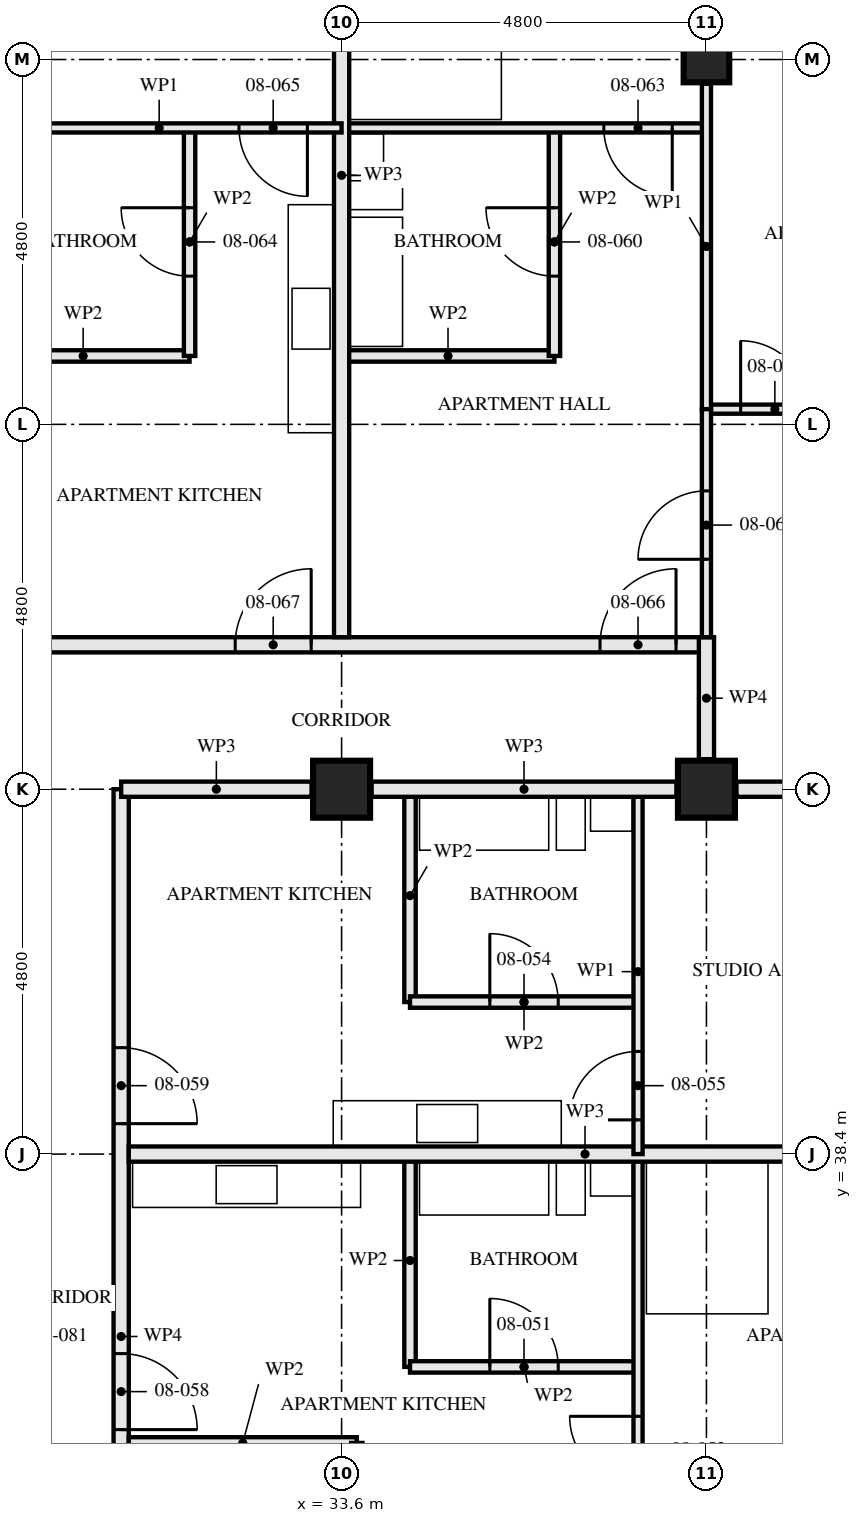
"""IFC4 building model, lengths in metres.
Left out: names, types, materials, properties, quantities, classifications, styles, units other than length and angle.
Written with IfcOpenShell. Run it as: python <this file> out.ifc"""

import sys

from ifc_helpers import new_model, si_unit, direction, frame, frame_2d, origin, origin_2d, place, context, subcontext, project, spatial, rectangle, hollow_rectangle, extrude, element, fill, save


model = new_model("IFC4")
c1 = context("Model", 3, precision=1e-05, world=origin(), true_north=direction((0.0, 1.0)))
c2 = subcontext(c1, "Body", "Model", "MODEL_VIEW")
j1 = project(units=[si_unit("LENGTHUNIT", "METRE"), si_unit("PLANEANGLEUNIT", "RADIAN")], contexts=[c1])
p1 = place(None, origin())
s1 = spatial("IfcSite", under=j1, at=p1, CompositionType="ELEMENT")
p2 = place(p1, origin())
s2 = spatial("IfcBuilding", under=s1, at=p2, CompositionType="ELEMENT")
p3 = place(p2, frame((0.0, 0.0, 34.0)))
s3 = spatial("IfcBuildingStorey", under=s2, at=p3, CompositionType="ELEMENT", Elevation=34.0)
for number, where, z_axis, x_axis in (
    (1, (33.6, 43.2, 0.0), (0.0, 0.0, 1.0), (0.0, 1.0, 0.0)),
    (2, (38.4, 43.2, 0.0), (0.0, 0.0, 1.0), (0.0, 1.0, 0.0)),
):
    element("IfcColumn", number, at=place(p3, frame(where, z_axis=z_axis, x_axis=x_axis)), inside=s3, PredefinedType="COLUMN", context=c2, shape_type="SweptSolid", body=[
        extrude(hollow_rectangle(XDim=0.75, YDim=0.75, WallThickness=0.08, at=origin_2d()), origin(), (0.0, 0.0, 1.0), 3.5),
    ])
p4 = place(p3, frame((38.4, 52.8, 0.0), z_axis=(0.0, 0.0, 1.0), x_axis=(0.0, 1.0, 0.0)))
e3 = element("IfcColumn", 3, at=p4, inside=s3, PredefinedType="COLUMN", context=c2, shape_type="SweptSolid", body=[
    extrude(hollow_rectangle(XDim=0.6, YDim=0.6, WallThickness=0.05, at=origin_2d()), origin(), (0.0, 0.0, 1.0), 3.5),
])
p5 = place(p3, frame((33.8, 32.2, 0.0), z_axis=(0.0, 0.0, 1.0), x_axis=(0.0, 1.0, 0.0)))
e4 = element("IfcWall", 4, at=p5, inside=s3, PredefinedType="PARTITIONING", context=c2, shape_type="SweptSolid", body=[
    extrude(rectangle(XDim=2.4, YDim=0.15, at=frame_2d((1.2, 0.0))), origin(), (0.0, 0.0, 1.0), 2.55),
])
p6 = place(p3, frame((33.8, 34.6, 0.0), z_axis=(0.0, 0.0, 1.0), x_axis=(-1.0, 0.0, 0.0)))
e5 = element("IfcWall", 5, at=p6, inside=s3, PredefinedType="PARTITIONING", context=c2, shape_type="SweptSolid", body=[
    extrude(rectangle(XDim=3.0, YDim=0.15, at=frame_2d((1.5, 0.0))), origin(), (0.0, 0.0, 1.0), 3.33),
])
p7 = place(p3, frame((37.5, 35.6, 0.0), z_axis=(0.0, 0.0, 1.0), x_axis=(-1.0, 0.0, 0.0)))
e6 = element("IfcWall", 6, at=p7, inside=s3, PredefinedType="PARTITIONING", context=c2, shape_type="SweptSolid", body=[
    extrude(rectangle(XDim=3.0, YDim=0.15, at=frame_2d((1.5, 0.0))), origin(), (0.0, 0.0, 1.0), 3.33),
])
p8 = place(p7, frame((1.05, 0.0, 0.0)))
e7 = element("IfcOpeningElement", 7, at=p8, cuts=e6, PredefinedType="OPENING", context=c2, shape_type="SweptSolid", body=[
    extrude(rectangle(XDim=0.9, YDim=2.1, at=frame_2d((0.45, 1.05))), frame((0.0, 0.085, 0.0), z_axis=(0.0, -1.0, 0.0), x_axis=(1.0, 0.0, 0.0)), (0.0, 0.0, 1.0), 0.171),
])
p9 = place(p3, frame((34.5, 35.6, 0.0), z_axis=(0.0, 0.0, 1.0), x_axis=(0.0, 1.0, 0.0)))
e8 = element("IfcWall", 8, at=p9, inside=s3, PredefinedType="PARTITIONING", context=c2, shape_type="SweptSolid", body=[
    extrude(rectangle(XDim=2.8, YDim=0.15, at=frame_2d((1.4, 0.0))), origin(), (0.0, 0.0, 1.0), 3.33),
])
p10 = place(p3, frame((37.5, 33.6, 0.0), z_axis=(0.0, 0.0, 1.0), x_axis=(0.0, 1.0, 0.0)))
e9 = element("IfcWall", 9, at=p10, inside=s3, PredefinedType="PARTITIONING", context=c2, shape_type="SweptSolid", body=[
    extrude(rectangle(XDim=4.8, YDim=0.12, at=frame_2d((2.4, 0.0))), origin(), (0.0, 0.0, 1.0), 3.33),
])
p11 = place(p10, frame((0.45, 0.0, 0.0)))
e10 = element("IfcOpeningElement", 10, at=p11, cuts=e9, PredefinedType="OPENING", context=c2, shape_type="SweptSolid", body=[
    extrude(rectangle(XDim=0.9, YDim=2.1, at=frame_2d((0.45, 1.05))), frame((0.0, 0.071, 0.0), z_axis=(0.0, -1.0, 0.0), x_axis=(1.0, 0.0, 0.0)), (0.0, 0.0, 1.0), 0.141),
])
p12 = place(p3, frame((42.805, 38.4, 0.0), z_axis=(0.0, 0.0, 1.0), x_axis=(-1.0, 0.0, 0.0)))
e11 = element("IfcWall", 11, at=p12, inside=s3, PredefinedType="PARTITIONING", context=c2, shape_type="SweptSolid", body=[
    extrude(rectangle(XDim=12.005, YDim=0.2, at=frame_2d((6.002, 0.0))), origin(), (0.0, 0.0, 1.0), 2.55),
])
p13 = place(p3, frame((37.5, 40.4, 0.0), z_axis=(0.0, 0.0, 1.0), x_axis=(-1.0, 0.0, 0.0)))
e12 = element("IfcWall", 12, at=p13, inside=s3, PredefinedType="PARTITIONING", context=c2, shape_type="SweptSolid", body=[
    extrude(rectangle(XDim=3.0, YDim=0.15, at=frame_2d((1.5, 0.0))), origin(), (0.0, 0.0, 1.0), 3.33),
])
p14 = place(p13, frame((1.05, 0.0, 0.0)))
e13 = element("IfcOpeningElement", 13, at=p14, cuts=e12, PredefinedType="OPENING", context=c2, shape_type="SweptSolid", body=[
    extrude(rectangle(XDim=0.9, YDim=2.1, at=frame_2d((0.45, 1.05))), frame((0.0, 0.085, 0.0), z_axis=(0.0, -1.0, 0.0), x_axis=(1.0, 0.0, 0.0)), (0.0, 0.0, 1.0), 0.171),
])
p15 = place(p3, frame((34.5, 40.4, 0.0), z_axis=(0.0, 0.0, 1.0), x_axis=(0.0, 1.0, 0.0)))
e14 = element("IfcWall", 14, at=p15, inside=s3, PredefinedType="PARTITIONING", context=c2, shape_type="SweptSolid", body=[
    extrude(rectangle(XDim=2.8, YDim=0.15, at=frame_2d((1.4, 0.0))), origin(), (0.0, 0.0, 1.0), 3.33),
])
p16 = place(p3, frame((37.5, 38.4, 0.0), z_axis=(0.0, 0.0, 1.0), x_axis=(0.0, 1.0, 0.0)))
e15 = element("IfcWall", 15, at=p16, inside=s3, PredefinedType="PARTITIONING", context=c2, shape_type="SweptSolid", body=[
    extrude(rectangle(XDim=4.8, YDim=0.12, at=frame_2d((2.4, 0.0))), origin(), (0.0, 0.0, 1.0), 3.33),
])
p17 = place(p16, frame((0.45, 0.0, 0.0)))
e16 = element("IfcOpeningElement", 16, at=p17, cuts=e15, PredefinedType="OPENING", context=c2, shape_type="SweptSolid", body=[
    extrude(rectangle(XDim=0.9, YDim=2.1, at=frame_2d((0.45, 1.05))), frame((0.0, 0.071, 0.0), z_axis=(0.0, -1.0, 0.0), x_axis=(1.0, 0.0, 0.0)), (0.0, 0.0, 1.0), 0.141),
])
p18 = place(p3, frame((30.7, 28.8, 0.0), z_axis=(0.0, 0.0, 1.0), x_axis=(0.0, 1.0, 0.0)))
e17 = element("IfcWall", 17, at=p18, inside=s3, PredefinedType="PARTITIONING", context=c2, shape_type="SweptSolid", body=[
    extrude(rectangle(XDim=14.4, YDim=0.2, at=frame_2d((7.2, 0.0))), origin(), (0.0, 0.0, 1.0), 2.55),
])
p19 = place(p18, frame((1.4, 0.0, 0.0)))
e18 = element("IfcOpeningElement", 18, at=p19, cuts=e17, PredefinedType="OPENING", context=c2, shape_type="SweptSolid", body=[
    extrude(rectangle(XDim=1.0, YDim=2.1, at=frame_2d((0.5, 1.05))), frame((0.0, 0.111, 0.0), z_axis=(0.0, -1.0, 0.0), x_axis=(1.0, 0.0, 0.0)), (0.0, 0.0, 1.0), 0.221),
])
p20 = place(p18, frame((4.1, 0.0, 0.0)))
e19 = element("IfcOpeningElement", 19, at=p20, cuts=e17, PredefinedType="OPENING", context=c2, shape_type="SweptSolid", body=[
    extrude(rectangle(XDim=1.0, YDim=2.1, at=frame_2d((0.5, 1.05))), frame((0.0, 0.111, 0.0), z_axis=(0.0, -1.0, 0.0), x_axis=(1.0, 0.0, 0.0)), (0.0, 0.0, 1.0), 0.221),
])
p21 = place(p18, frame((5.975, 0.0, 0.0)))
e20 = element("IfcOpeningElement", 20, at=p21, cuts=e17, PredefinedType="OPENING", context=c2, shape_type="SweptSolid", body=[
    extrude(rectangle(XDim=1.0, YDim=2.1, at=frame_2d((0.5, 1.05))), frame((0.0, 0.111, 0.0), z_axis=(0.0, -1.0, 0.0), x_axis=(1.0, 0.0, 0.0)), (0.0, 0.0, 1.0), 0.221),
])
p22 = place(p18, frame((10.0, 0.0, 0.0)))
e21 = element("IfcOpeningElement", 21, at=p22, cuts=e17, PredefinedType="OPENING", context=c2, shape_type="SweptSolid", body=[
    extrude(rectangle(XDim=1.0, YDim=2.1, at=frame_2d((0.5, 1.05))), frame((0.0, 0.111, 0.0), z_axis=(0.0, -1.0, 0.0), x_axis=(1.0, 0.0, 0.0)), (0.0, 0.0, 1.0), 0.221),
])
p23 = place(p3, frame((36.4, 51.9, 0.0), z_axis=(0.0, 0.0, 1.0), x_axis=(0.0, -1.0, 0.0)))
e22 = element("IfcWall", 22, at=p23, inside=s3, PredefinedType="PARTITIONING", context=c2, shape_type="SweptSolid", body=[
    extrude(rectangle(XDim=3.0, YDim=0.15, at=frame_2d((1.5, 0.0))), origin(), (0.0, 0.0, 1.0), 3.33),
])
p24 = place(p23, frame((1.05, 0.0, 0.0)))
e23 = element("IfcOpeningElement", 23, at=p24, cuts=e22, PredefinedType="OPENING", context=c2, shape_type="SweptSolid", body=[
    extrude(rectangle(XDim=0.9, YDim=2.1, at=frame_2d((0.45, 1.05))), frame((0.0, 0.085, 0.0), z_axis=(0.0, -1.0, 0.0), x_axis=(1.0, 0.0, 0.0)), (0.0, 0.0, 1.0), 0.171),
])
p25 = place(p3, frame((36.4, 48.9, 0.0), z_axis=(0.0, 0.0, 1.0), x_axis=(-1.0, 0.0, 0.0)))
e24 = element("IfcWall", 24, at=p25, inside=s3, PredefinedType="PARTITIONING", context=c2, shape_type="SweptSolid", body=[
    extrude(rectangle(XDim=2.8, YDim=0.15, at=frame_2d((1.4, 0.0))), origin(), (0.0, 0.0, 1.0), 3.33),
])
p26 = place(p3, frame((38.4, 48.2, 0.0), z_axis=(0.0, 0.0, 1.0), x_axis=(0.0, -1.0, 0.0)))
e25 = element("IfcWall", 25, at=p26, inside=s3, PredefinedType="PARTITIONING", context=c2, shape_type="SweptSolid", body=[
    extrude(rectangle(XDim=3.0, YDim=0.12, at=frame_2d((1.5, 0.0))), origin(), (0.0, 0.0, 1.0), 2.55),
])
p27 = place(p26, frame((1.075, 0.0, 0.0)))
e26 = element("IfcOpeningElement", 26, at=p27, cuts=e25, PredefinedType="OPENING", context=c2, shape_type="SweptSolid", body=[
    extrude(rectangle(XDim=0.9, YDim=2.1, at=frame_2d((0.45, 1.05))), frame((0.0, 0.071, 0.0), z_axis=(0.0, -1.0, 0.0), x_axis=(1.0, 0.0, 0.0)), (0.0, 0.0, 1.0), 0.141),
])
p28 = place(p3, frame((42.953, 48.2, 0.0), z_axis=(0.0, 0.0, 1.0), x_axis=(-1.0, 0.0, 0.0)))
e27 = element("IfcWall", 27, at=p28, inside=s3, PredefinedType="PARTITIONING", context=c2, shape_type="SweptSolid", body=[
    extrude(rectangle(XDim=4.553, YDim=0.12, at=frame_2d((2.276, 0.0))), origin(), (0.0, 0.0, 1.0), 3.33),
])
p29 = place(p28, frame((3.203, 0.0, 0.0)))
e28 = element("IfcOpeningElement", 28, at=p29, cuts=e27, PredefinedType="OPENING", context=c2, shape_type="SweptSolid", body=[
    extrude(rectangle(XDim=0.9, YDim=2.1, at=frame_2d((0.45, 1.05))), frame((0.0, 0.071, 0.0), z_axis=(0.0, -1.0, 0.0), x_axis=(1.0, 0.0, 0.0)), (0.0, 0.0, 1.0), 0.141),
])
p30 = place(p3, frame((38.4, 51.9, 0.0), z_axis=(0.0, 0.0, 1.0), x_axis=(-1.0, 0.0, 0.0)))
e29 = element("IfcWall", 29, at=p30, inside=s3, PredefinedType="PARTITIONING", context=c2, shape_type="SweptSolid", body=[
    extrude(rectangle(XDim=4.8, YDim=0.12, at=frame_2d((2.4, 0.0))), origin(), (0.0, 0.0, 1.0), 3.33),
])
p31 = place(p30, frame((0.45, 0.0, 0.0)))
e30 = element("IfcOpeningElement", 30, at=p31, cuts=e29, PredefinedType="OPENING", context=c2, shape_type="SweptSolid", body=[
    extrude(rectangle(XDim=0.9, YDim=2.1, at=frame_2d((0.45, 1.05))), frame((0.0, 0.071, 0.0), z_axis=(0.0, -1.0, 0.0), x_axis=(1.0, 0.0, 0.0)), (0.0, 0.0, 1.0), 0.141),
])
p32 = place(p3, frame((38.4, 52.48, 0.0), z_axis=(0.0, 0.0, 1.0), x_axis=(0.0, -1.0, 0.0)))
e31 = element("IfcWall", 31, at=p32, inside=s3, PredefinedType="PARTITIONING", context=c2, shape_type="SweptSolid", body=[
    extrude(rectangle(XDim=4.28, YDim=0.12, at=frame_2d((2.14, 0.0))), origin(), (0.0, 0.0, 1.0), 3.33),
])
p33 = place(p3, frame((33.6, 57.353, 0.0), z_axis=(0.0, 0.0, 1.0), x_axis=(0.0, -1.0, 0.0)))
e32 = element("IfcWall", 32, at=p33, inside=s3, PredefinedType="PARTITIONING", context=c2, shape_type="SweptSolid", body=[
    extrude(rectangle(XDim=12.153, YDim=0.2, at=frame_2d((6.077, 0.0))), origin(), (0.0, 0.0, 1.0), 2.55),
])
p34 = place(p3, frame((31.6, 51.9, 0.0), z_axis=(0.0, 0.0, 1.0), x_axis=(0.0, -1.0, 0.0)))
e33 = element("IfcWall", 33, at=p34, inside=s3, PredefinedType="PARTITIONING", context=c2, shape_type="SweptSolid", body=[
    extrude(rectangle(XDim=3.0, YDim=0.15, at=frame_2d((1.5, 0.0))), origin(), (0.0, 0.0, 1.0), 3.33),
])
p35 = place(p34, frame((1.05, 0.0, 0.0)))
e34 = element("IfcOpeningElement", 34, at=p35, cuts=e33, PredefinedType="OPENING", context=c2, shape_type="SweptSolid", body=[
    extrude(rectangle(XDim=0.9, YDim=2.1, at=frame_2d((0.45, 1.05))), frame((0.0, 0.085, 0.0), z_axis=(0.0, -1.0, 0.0), x_axis=(1.0, 0.0, 0.0)), (0.0, 0.0, 1.0), 0.171),
])
p36 = place(p3, frame((31.6, 48.9, 0.0), z_axis=(0.0, 0.0, 1.0), x_axis=(-1.0, 0.0, 0.0)))
e35 = element("IfcWall", 35, at=p36, inside=s3, PredefinedType="PARTITIONING", context=c2, shape_type="SweptSolid", body=[
    extrude(rectangle(XDim=2.8, YDim=0.15, at=frame_2d((1.4, 0.0))), origin(), (0.0, 0.0, 1.0), 3.33),
])
p37 = place(p3, frame((33.6, 51.9, 0.0), z_axis=(0.0, 0.0, 1.0), x_axis=(-1.0, 0.0, 0.0)))
e36 = element("IfcWall", 36, at=p37, inside=s3, PredefinedType="PARTITIONING", context=c2, shape_type="SweptSolid", body=[
    extrude(rectangle(XDim=4.8, YDim=0.12, at=frame_2d((2.4, 0.0))), origin(), (0.0, 0.0, 1.0), 3.33),
])
p38 = place(p37, frame((0.45, 0.0, 0.0)))
e37 = element("IfcOpeningElement", 37, at=p38, cuts=e36, PredefinedType="OPENING", context=c2, shape_type="SweptSolid", body=[
    extrude(rectangle(XDim=0.9, YDim=2.1, at=frame_2d((0.45, 1.05))), frame((0.0, 0.071, 0.0), z_axis=(0.0, -1.0, 0.0), x_axis=(1.0, 0.0, 0.0)), (0.0, 0.0, 1.0), 0.141),
])
p39 = place(p3, frame((38.4, 45.1, 0.0), z_axis=(0.0, 0.0, 1.0), x_axis=(-1.0, 0.0, 0.0)))
e38 = element("IfcWall", 38, at=p39, inside=s3, PredefinedType="PARTITIONING", context=c2, shape_type="SweptSolid", body=[
    extrude(rectangle(XDim=9.6, YDim=0.2, at=frame_2d((4.8, 0.0))), origin(), (0.0, 0.0, 1.0), 3.33),
])
p40 = place(p39, frame((0.4, 0.0, 0.0)))
e39 = element("IfcOpeningElement", 39, at=p40, cuts=e38, PredefinedType="OPENING", context=c2, shape_type="SweptSolid", body=[
    extrude(rectangle(XDim=1.0, YDim=2.1, at=frame_2d((0.5, 1.05))), frame((0.0, 0.111, 0.0), z_axis=(0.0, -1.0, 0.0), x_axis=(1.0, 0.0, 0.0)), (0.0, 0.0, 1.0), 0.221),
])
p41 = place(p39, frame((5.2, 0.0, 0.0)))
e40 = element("IfcOpeningElement", 40, at=p41, cuts=e38, PredefinedType="OPENING", context=c2, shape_type="SweptSolid", body=[
    extrude(rectangle(XDim=1.0, YDim=2.1, at=frame_2d((0.5, 1.05))), frame((0.0, 0.111, 0.0), z_axis=(0.0, -1.0, 0.0), x_axis=(1.0, 0.0, 0.0)), (0.0, 0.0, 1.0), 0.221),
])
p42 = place(p3, frame((38.4, 45.2, 0.0), z_axis=(0.0, 0.0, 1.0), x_axis=(0.0, -1.0, 0.0)))
e41 = element("IfcWall", 41, at=p42, inside=s3, PredefinedType="PARTITIONING", context=c2, shape_type="SweptSolid", body=[
    extrude(rectangle(XDim=1.605, YDim=0.2, at=frame_2d((0.802, 0.0))), origin(), (0.0, 0.0, 1.0), 3.33),
])
p43 = place(p3, frame((42.896, 43.2, 0.0), z_axis=(0.0, 0.0, 1.0), x_axis=(-1.0, 0.0, 0.0)))
e42 = element("IfcWall", 42, at=p43, inside=s3, PredefinedType="PARTITIONING", context=c2, shape_type="SweptSolid", body=[
    extrude(rectangle(XDim=4.101, YDim=0.2, at=frame_2d((2.05, 0.0))), origin(), (0.0, 0.0, 1.0), 2.32),
])
p44 = place(p3, frame((38.005, 43.2, 0.0), z_axis=(0.0, 0.0, 1.0), x_axis=(-1.0, 0.0, 0.0)))
e43 = element("IfcWall", 43, at=p44, inside=s3, PredefinedType="PARTITIONING", context=c2, shape_type="SweptSolid", body=[
    extrude(rectangle(XDim=4.01, YDim=0.2, at=frame_2d((2.005, 0.0))), origin(), (0.0, 0.0, 1.0), 2.32),
])
p45 = place(p3, frame((33.205, 43.2, 0.0), z_axis=(0.0, 0.0, 1.0), x_axis=(-1.0, 0.0, 0.0)))
e44 = element("IfcWall", 44, at=p45, inside=s3, PredefinedType="PARTITIONING", context=c2, shape_type="SweptSolid", body=[
    extrude(rectangle(XDim=2.505, YDim=0.2, at=frame_2d((1.252, 0.0))), origin(), (0.0, 0.0, 1.0), 2.32),
])
p46 = place(p8, frame((0.9, 0.0, 0.0), z_axis=(0.0, 0.0, 1.0), x_axis=(-1.0, 0.0, 0.0)))
e45 = element("IfcDoor", 45, at=p46, inside=s3, OperationType="SINGLE_SWING_RIGHT", PredefinedType="DOOR", context=c2, shape_type="SweptSolid", body=[
    extrude(rectangle(XDim=0.9, YDim=2.1, at=frame_2d((0.45, 1.05))), frame((0.0, 0.022, 0.0), z_axis=(0.0, -1.0, 0.0), x_axis=(1.0, 0.0, 0.0)), (0.0, 0.0, 1.0), 0.044),
])
fill(e7, e45)
p47 = place(p11, origin())
e46 = element("IfcDoor", 46, at=p47, inside=s3, OperationType="SINGLE_SWING_LEFT", PredefinedType="DOOR", context=c2, shape_type="SweptSolid", body=[
    extrude(rectangle(XDim=0.9, YDim=2.1, at=frame_2d((0.45, 1.05))), frame((0.0, 0.022, 0.0), z_axis=(0.0, -1.0, 0.0), x_axis=(1.0, 0.0, 0.0)), (0.0, 0.0, 1.0), 0.044),
])
fill(e10, e46)
p48 = place(p14, frame((0.9, 0.0, 0.0), z_axis=(0.0, 0.0, 1.0), x_axis=(-1.0, 0.0, 0.0)))
e47 = element("IfcDoor", 47, at=p48, inside=s3, OperationType="SINGLE_SWING_RIGHT", PredefinedType="DOOR", context=c2, shape_type="SweptSolid", body=[
    extrude(rectangle(XDim=0.9, YDim=2.1, at=frame_2d((0.45, 1.05))), frame((0.0, 0.022, 0.0), z_axis=(0.0, -1.0, 0.0), x_axis=(1.0, 0.0, 0.0)), (0.0, 0.0, 1.0), 0.044),
])
fill(e13, e47)
p49 = place(p17, origin())
e48 = element("IfcDoor", 48, at=p49, inside=s3, OperationType="SINGLE_SWING_RIGHT", PredefinedType="DOOR", context=c2, shape_type="SweptSolid", body=[
    extrude(rectangle(XDim=0.9, YDim=2.1, at=frame_2d((0.45, 1.05))), frame((0.0, 0.022, 0.0), z_axis=(0.0, -1.0, 0.0), x_axis=(1.0, 0.0, 0.0)), (0.0, 0.0, 1.0), 0.044),
])
fill(e16, e48)
p50 = place(p21, frame((1.0, 0.0, 0.0), z_axis=(0.0, 0.0, 1.0), x_axis=(-1.0, 0.0, 0.0)))
e49 = element("IfcDoor", 49, at=p50, inside=s3, OperationType="SINGLE_SWING_LEFT", PredefinedType="DOOR", context=c2, shape_type="SweptSolid", body=[
    extrude(rectangle(XDim=1.0, YDim=2.1, at=frame_2d((0.5, 1.05))), frame((0.0, 0.027, 0.0), z_axis=(0.0, -1.0, 0.0), x_axis=(1.0, 0.0, 0.0)), (0.0, 0.0, 1.0), 0.054),
])
fill(e20, e49)
p51 = place(p22, frame((1.0, 0.0, 0.0), z_axis=(0.0, 0.0, 1.0), x_axis=(-1.0, 0.0, 0.0)))
e50 = element("IfcDoor", 50, at=p51, inside=s3, OperationType="SINGLE_SWING_LEFT", PredefinedType="DOOR", context=c2, shape_type="SweptSolid", body=[
    extrude(rectangle(XDim=1.0, YDim=2.1, at=frame_2d((0.5, 1.05))), frame((0.0, 0.027, 0.0), z_axis=(0.0, -1.0, 0.0), x_axis=(1.0, 0.0, 0.0)), (0.0, 0.0, 1.0), 0.054),
])
fill(e21, e50)
p52 = place(p24, frame((0.9, 0.0, 0.0), z_axis=(0.0, 0.0, 1.0), x_axis=(-1.0, 0.0, 0.0)))
e51 = element("IfcDoor", 51, at=p52, inside=s3, OperationType="SINGLE_SWING_LEFT", PredefinedType="DOOR", context=c2, shape_type="SweptSolid", body=[
    extrude(rectangle(XDim=0.9, YDim=2.1, at=frame_2d((0.45, 1.05))), frame((0.0, 0.022, 0.0), z_axis=(0.0, -1.0, 0.0), x_axis=(1.0, 0.0, 0.0)), (0.0, 0.0, 1.0), 0.044),
])
fill(e23, e51)
p53 = place(p27, frame((0.9, 0.0, 0.0), z_axis=(0.0, 0.0, 1.0), x_axis=(-1.0, 0.0, 0.0)))
e52 = element("IfcDoor", 52, at=p53, inside=s3, OperationType="SINGLE_SWING_RIGHT", PredefinedType="DOOR", context=c2, shape_type="SweptSolid", body=[
    extrude(rectangle(XDim=0.9, YDim=2.1, at=frame_2d((0.45, 1.05))), frame((0.0, 0.022, 0.0), z_axis=(0.0, -1.0, 0.0), x_axis=(1.0, 0.0, 0.0)), (0.0, 0.0, 1.0), 0.044),
])
fill(e26, e52)
p54 = place(p29, frame((0.9, 0.0, 0.0), z_axis=(0.0, 0.0, 1.0), x_axis=(-1.0, 0.0, 0.0)))
e53 = element("IfcDoor", 53, at=p54, inside=s3, OperationType="SINGLE_SWING_RIGHT", PredefinedType="DOOR", context=c2, shape_type="SweptSolid", body=[
    extrude(rectangle(XDim=0.9, YDim=2.1, at=frame_2d((0.45, 1.05))), frame((0.0, 0.022, 0.0), z_axis=(0.0, -1.0, 0.0), x_axis=(1.0, 0.0, 0.0)), (0.0, 0.0, 1.0), 0.044),
])
fill(e28, e53)
p55 = place(p31, origin())
e54 = element("IfcDoor", 54, at=p55, inside=s3, OperationType="SINGLE_SWING_RIGHT", PredefinedType="DOOR", context=c2, shape_type="SweptSolid", body=[
    extrude(rectangle(XDim=0.9, YDim=2.1, at=frame_2d((0.45, 1.05))), frame((0.0, 0.022, 0.0), z_axis=(0.0, -1.0, 0.0), x_axis=(1.0, 0.0, 0.0)), (0.0, 0.0, 1.0), 0.044),
])
fill(e30, e54)
p56 = place(p35, frame((0.9, 0.0, 0.0), z_axis=(0.0, 0.0, 1.0), x_axis=(-1.0, 0.0, 0.0)))
e55 = element("IfcDoor", 55, at=p56, inside=s3, OperationType="SINGLE_SWING_LEFT", PredefinedType="DOOR", context=c2, shape_type="SweptSolid", body=[
    extrude(rectangle(XDim=0.9, YDim=2.1, at=frame_2d((0.45, 1.05))), frame((0.0, 0.022, 0.0), z_axis=(0.0, -1.0, 0.0), x_axis=(1.0, 0.0, 0.0)), (0.0, 0.0, 1.0), 0.044),
])
fill(e34, e55)
p57 = place(p38, origin())
e56 = element("IfcDoor", 56, at=p57, inside=s3, OperationType="SINGLE_SWING_RIGHT", PredefinedType="DOOR", context=c2, shape_type="SweptSolid", body=[
    extrude(rectangle(XDim=0.9, YDim=2.1, at=frame_2d((0.45, 1.05))), frame((0.0, 0.022, 0.0), z_axis=(0.0, -1.0, 0.0), x_axis=(1.0, 0.0, 0.0)), (0.0, 0.0, 1.0), 0.044),
])
fill(e37, e56)
p58 = place(p40, frame((1.0, 0.0, 0.0), z_axis=(0.0, 0.0, 1.0), x_axis=(-1.0, 0.0, 0.0)))
e57 = element("IfcDoor", 57, at=p58, inside=s3, OperationType="SINGLE_SWING_LEFT", PredefinedType="DOOR", context=c2, shape_type="SweptSolid", body=[
    extrude(rectangle(XDim=1.0, YDim=2.1, at=frame_2d((0.5, 1.05))), frame((0.0, 0.027, 0.0), z_axis=(0.0, -1.0, 0.0), x_axis=(1.0, 0.0, 0.0)), (0.0, 0.0, 1.0), 0.054),
])
fill(e39, e57)
p59 = place(p41, frame((1.0, 0.0, 0.0), z_axis=(0.0, 0.0, 1.0), x_axis=(-1.0, 0.0, 0.0)))
e58 = element("IfcDoor", 58, at=p59, inside=s3, OperationType="SINGLE_SWING_LEFT", PredefinedType="DOOR", context=c2, shape_type="SweptSolid", body=[
    extrude(rectangle(XDim=1.0, YDim=2.1, at=frame_2d((0.5, 1.05))), frame((0.0, 0.027, 0.0), z_axis=(0.0, -1.0, 0.0), x_axis=(1.0, 0.0, 0.0)), (0.0, 0.0, 1.0), 0.054),
])
fill(e40, e58)
save(model, sys.argv[1])
